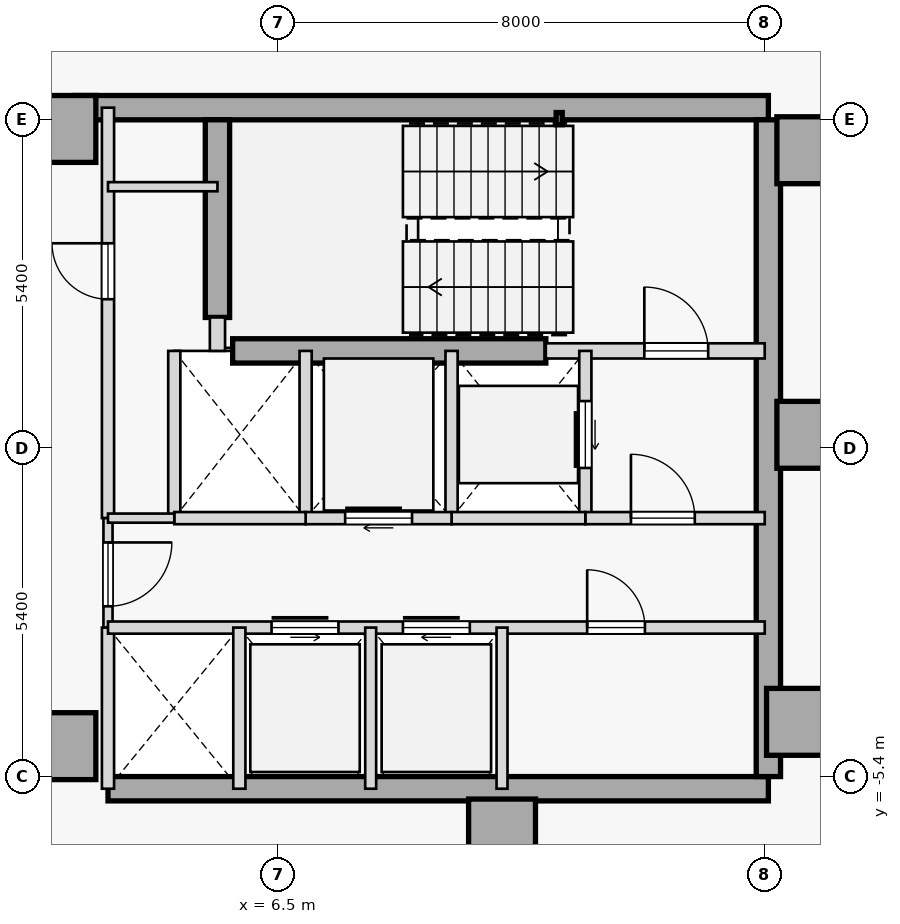
"""IFC4 building model, lengths in metres.
Left out: names, types, materials, properties, quantities, classifications, styles, units other than length and angle.
Written with IfcOpenShell. Run it as: python <this file> out.ifc"""

import sys

from ifc_helpers import new_model, si_unit, direction, frame, frame_2d, origin, origin_2d, place, context, subcontext, project, spatial, rectangle, hollow_rectangle, extrude, element, fill, save


model = new_model("IFC4")
c1 = context("Model", 3, precision=1e-05, world=origin(), true_north=direction((0.0, 1.0)))
c2 = subcontext(c1, "Body", "Model", "MODEL_VIEW")
j1 = project(units=[si_unit("LENGTHUNIT", "METRE"), si_unit("PLANEANGLEUNIT", "RADIAN")], contexts=[c1])
p1 = place(None, origin())
s1 = spatial("IfcSite", under=j1, at=p1, CompositionType="ELEMENT")
p2 = place(p1, origin())
s2 = spatial("IfcBuilding", under=s1, at=p2, CompositionType="ELEMENT")
p3 = place(p2, frame((0.0, 0.0, 124.4)))
s3 = spatial("IfcBuildingStorey", under=s2, at=p3, CompositionType="ELEMENT", Elevation=124.4)
for number, where, z_axis, x_axis in (
    (1, (15.25, 4.9, 0.0), (0.0, 0.0, 1.0), (1.0, 0.0, 0.0)),
    (2, (15.25, 0.22, 0.0), (0.0, 0.0, 1.0), (1.0, 0.0, 0.0)),
    (3, (15.08, -4.5, 0.0), (0.0, 0.0, 1.0), (1.0, 0.0, 0.0)),
    (4, (10.18, -6.32, 0.0), (0.0, 0.0, 1.0), (1.0, 0.0, 0.0)),
    (5, (2.95, -4.9, 0.0), (0.0, 0.0, 1.0), (1.0, 0.0, 0.0)),
    (6, (2.95, 5.25, 0.0), (0.0, 0.0, 1.0), (1.0, 0.0, 0.0)),
):
    element("IfcColumn", number, at=place(p3, frame(where, z_axis=z_axis, x_axis=x_axis)), inside=s3, PredefinedType="COLUMN", context=c2, shape_type="SweptSolid", body=[
        extrude(rectangle(XDim=1.1, YDim=1.1, at=origin_2d()), origin(), (0.0, 0.0, 1.0), 3.7),
    ])
p4 = place(p3, frame((3.15, 5.6, 0.0), z_axis=(0.0, 0.0, 1.0), x_axis=(1.0, 0.0, 0.0)))
e7 = element("IfcWall", 7, at=p4, inside=s3, PredefinedType="SHEAR", context=c2, shape_type="SweptSolid", body=[
    extrude(rectangle(XDim=11.41, YDim=0.4, at=frame_2d((5.705, 0.0))), origin(), (0.0, 0.0, 1.0), 3.475),
])
p5 = place(p3, frame((3.7, -5.6, 0.0), z_axis=(0.0, 0.0, 1.0), x_axis=(1.0, 0.0, 0.0)))
e8 = element("IfcWall", 8, at=p5, inside=s3, PredefinedType="SHEAR", context=c2, shape_type="SweptSolid", body=[
    extrude(rectangle(XDim=10.86, YDim=0.4, at=frame_2d((5.43, 0.0))), origin(), (0.0, 0.0, 1.0), 3.475),
])
p6 = place(p3, frame((14.56, -5.4, 0.0), z_axis=(0.0, 0.0, 1.0), x_axis=(0.0, 1.0, 0.0)))
e9 = element("IfcWall", 9, at=p6, inside=s3, PredefinedType="SHEAR", context=c2, shape_type="SweptSolid", body=[
    extrude(rectangle(XDim=10.8, YDim=0.4, at=frame_2d((5.4, 0.0))), origin(), (0.0, 0.0, 1.0), 3.475),
])
p7 = place(p3, frame((5.5, 2.15, 0.0), z_axis=(0.0, 0.0, 1.0), x_axis=(0.0, 1.0, 0.0)))
e10 = element("IfcWall", 10, at=p7, inside=s3, PredefinedType="SHEAR", context=c2, shape_type="SweptSolid", body=[
    extrude(rectangle(XDim=3.25, YDim=0.4, at=frame_2d((1.625, 0.0))), origin(), (0.0, 0.0, 1.0), 3.475),
])
p8 = place(p3, frame((5.75, 1.6, 0.0), z_axis=(0.0, 0.0, 1.0), x_axis=(1.0, 0.0, 0.0)))
e11 = element("IfcWall", 11, at=p8, inside=s3, PredefinedType="SHEAR", context=c2, shape_type="SweptSolid", body=[
    extrude(rectangle(XDim=5.15, YDim=0.4, at=frame_2d((2.575, 0.0))), origin(), (0.0, 0.0, 1.0), 3.475),
])
p9 = place(p3, frame((11.12, 5.42, 0.0), z_axis=(0.0, 0.0, 1.0), x_axis=(1.0, 0.0, 0.0)))
e12 = element("IfcColumn", 12, at=p9, inside=s3, PredefinedType="COLUMN", context=c2, shape_type="SweptSolid", body=[
    extrude(hollow_rectangle(XDim=0.1, YDim=0.2, WallThickness=0.008, at=origin_2d()), origin(), (0.0, 0.0, 1.0), 3.7),
])
p10 = place(p3, frame((10.9, 1.6, 0.0), z_axis=(0.0, 0.0, 1.0), x_axis=(1.0, 0.0, 0.0)))
e13 = element("IfcWall", 13, at=p10, inside=s3, PredefinedType="STANDARD", context=c2, shape_type="SweptSolid", body=[
    extrude(rectangle(XDim=3.6, YDim=0.25, at=frame_2d((1.8, 0.0))), origin(), (0.0, 0.0, 1.0), 3.475),
])
p11 = place(p10, frame((1.62, 0.0, 0.0)))
e14 = element("IfcOpeningElement", 14, at=p11, cuts=e13, PredefinedType="OPENING", context=c2, shape_type="SweptSolid", body=[
    extrude(rectangle(XDim=1.05, YDim=2.15, at=frame_2d((0.525, 1.075))), frame((0.0, 0.135, 0.0), z_axis=(0.0, -1.0, 0.0), x_axis=(1.0, 0.0, 0.0)), (0.0, 0.0, 1.0), 0.27),
])
p12 = place(p3, frame((5.5, 1.6, 0.0), z_axis=(0.0, 0.0, 1.0), x_axis=(0.0, 1.0, 0.0)))
e15 = element("IfcWall", 15, at=p12, inside=s3, PredefinedType="STANDARD", context=c2, shape_type="SweptSolid", body=[
    extrude(rectangle(XDim=0.55, YDim=0.25, at=frame_2d((0.275, 0.0))), origin(), (0.0, 0.0, 1.0), 3.475),
])
p13 = place(p3, frame((3.7, -1.15, 0.0), z_axis=(0.0, 0.0, 1.0), x_axis=(0.0, 1.0, 0.0)))
e16 = element("IfcWall", 16, at=p13, inside=s3, PredefinedType="STANDARD", context=c2, shape_type="SweptSolid", body=[
    extrude(rectangle(XDim=6.75, YDim=0.2, at=frame_2d((3.375, 0.0))), origin(), (0.0, 0.0, 1.0), 3.475),
])
p14 = place(p13, frame((3.6, 0.0, 0.0)))
e17 = element("IfcOpeningElement", 17, at=p14, cuts=e16, PredefinedType="OPENING", context=c2, shape_type="SweptSolid", body=[
    extrude(rectangle(XDim=0.92, YDim=2.15, at=frame_2d((0.46, 1.075))), frame((0.0, 0.11, 0.0), z_axis=(0.0, -1.0, 0.0), x_axis=(1.0, 0.0, 0.0)), (0.0, 0.0, 1.0), 0.22),
])
p15 = place(p3, frame((3.7, -2.95, 0.0), z_axis=(0.0, 0.0, 1.0), x_axis=(0.0, 1.0, 0.0)))
e18 = element("IfcWall", 18, at=p15, inside=s3, PredefinedType="PARTITIONING", context=c2, shape_type="SweptSolid", body=[
    extrude(rectangle(XDim=1.8, YDim=0.15, at=frame_2d((0.9, 0.0))), origin(), (0.0, 0.0, 1.0), 3.475),
])
p16 = place(p15, frame((0.35, 0.0, 0.0)))
e19 = element("IfcOpeningElement", 19, at=p16, cuts=e18, PredefinedType="OPENING", context=c2, shape_type="SweptSolid", body=[
    extrude(rectangle(XDim=1.05, YDim=2.18, at=frame_2d((0.525, 1.09))), frame((0.0, 0.085, 0.0), z_axis=(0.0, -1.0, 0.0), x_axis=(1.0, 0.0, 0.0)), (0.0, 0.0, 1.0), 0.17),
])
p17 = place(p3, frame((3.7, -5.6, 0.0), z_axis=(0.0, 0.0, 1.0), x_axis=(0.0, 1.0, 0.0)))
e20 = element("IfcWall", 20, at=p17, inside=s3, PredefinedType="STANDARD", context=c2, shape_type="SweptSolid", body=[
    extrude(rectangle(XDim=2.65, YDim=0.2, at=frame_2d((1.325, 0.0))), origin(), (0.0, 0.0, 1.0), 3.475),
])
p18 = place(p3, frame((11.55, -1.15, 0.0), z_axis=(0.0, 0.0, 1.0), x_axis=(0.0, 1.0, 0.0)))
e21 = element("IfcWall", 21, at=p18, inside=s3, PredefinedType="STANDARD", context=c2, shape_type="SweptSolid", body=[
    extrude(rectangle(XDim=2.75, YDim=0.2, at=frame_2d((1.375, 0.0))), origin(), (0.0, 0.0, 1.0), 3.475),
])
p19 = place(p18, frame((0.825, 0.0, 0.0)))
e22 = element("IfcOpeningElement", 22, at=p19, cuts=e21, PredefinedType="OPENING", context=c2, shape_type="SweptSolid", body=[
    extrude(rectangle(XDim=1.1, YDim=2.15, at=frame_2d((0.55, 1.075))), frame((0.0, 0.11, 0.0), z_axis=(0.0, -1.0, 0.0), x_axis=(1.0, 0.0, 0.0)), (0.0, 0.0, 1.0), 0.22),
])
p20 = place(p3, frame((9.35, -1.15, 0.0), z_axis=(0.0, 0.0, 1.0), x_axis=(0.0, 1.0, 0.0)))
e23 = element("IfcWall", 23, at=p20, inside=s3, PredefinedType="STANDARD", context=c2, shape_type="SweptSolid", body=[
    extrude(rectangle(XDim=2.75, YDim=0.2, at=frame_2d((1.375, 0.0))), origin(), (0.0, 0.0, 1.0), 3.475),
])
p21 = place(p3, frame((11.55, -1.15, 0.0), z_axis=(0.0, 0.0, 1.0), x_axis=(1.0, 0.0, 0.0)))
e24 = element("IfcWall", 24, at=p21, inside=s3, PredefinedType="STANDARD", context=c2, shape_type="SweptSolid", body=[
    extrude(rectangle(XDim=2.95, YDim=0.2, at=frame_2d((1.475, 0.0))), origin(), (0.0, 0.0, 1.0), 3.475),
])
p22 = place(p21, frame((0.75, 0.0, 0.0)))
e25 = element("IfcOpeningElement", 25, at=p22, cuts=e24, PredefinedType="OPENING", context=c2, shape_type="SweptSolid", body=[
    extrude(rectangle(XDim=1.05, YDim=2.18, at=frame_2d((0.525, 1.09))), frame((0.0, 0.11, 0.0), z_axis=(0.0, -1.0, 0.0), x_axis=(1.0, 0.0, 0.0)), (0.0, 0.0, 1.0), 0.22),
])
p23 = place(p3, frame((9.35, -1.15, 0.0), z_axis=(0.0, 0.0, 1.0), x_axis=(1.0, 0.0, 0.0)))
e26 = element("IfcWall", 26, at=p23, inside=s3, PredefinedType="STANDARD", context=c2, shape_type="SweptSolid", body=[
    extrude(rectangle(XDim=2.2, YDim=0.2, at=frame_2d((1.1, 0.0))), origin(), (0.0, 0.0, 1.0), 3.475),
])
p24 = place(p3, frame((6.95, -1.15, 0.0), z_axis=(0.0, 0.0, 1.0), x_axis=(0.0, 1.0, 0.0)))
e27 = element("IfcWall", 27, at=p24, inside=s3, PredefinedType="STANDARD", context=c2, shape_type="SweptSolid", body=[
    extrude(rectangle(XDim=2.75, YDim=0.2, at=frame_2d((1.375, 0.0))), origin(), (0.0, 0.0, 1.0), 3.475),
])
p25 = place(p3, frame((6.95, -1.15, 0.0), z_axis=(0.0, 0.0, 1.0), x_axis=(1.0, 0.0, 0.0)))
e28 = element("IfcWall", 28, at=p25, inside=s3, PredefinedType="STANDARD", context=c2, shape_type="SweptSolid", body=[
    extrude(rectangle(XDim=2.4, YDim=0.2, at=frame_2d((1.2, 0.0))), origin(), (0.0, 0.0, 1.0), 3.475),
])
p26 = place(p25, frame((0.65, 0.0, 0.0)))
e29 = element("IfcOpeningElement", 29, at=p26, cuts=e28, PredefinedType="OPENING", context=c2, shape_type="SweptSolid", body=[
    extrude(rectangle(XDim=1.1, YDim=2.15, at=frame_2d((0.55, 1.075))), frame((0.0, 0.11, 0.0), z_axis=(0.0, -1.0, 0.0), x_axis=(1.0, 0.0, 0.0)), (0.0, 0.0, 1.0), 0.22),
])
p27 = place(p3, frame((4.79, -1.15, 0.0), z_axis=(0.0, 0.0, 1.0), x_axis=(0.0, 1.0, 0.0)))
e30 = element("IfcWall", 30, at=p27, inside=s3, PredefinedType="STANDARD", context=c2, shape_type="SweptSolid", body=[
    extrude(rectangle(XDim=2.75, YDim=0.2, at=frame_2d((1.375, 0.0))), origin(), (0.0, 0.0, 1.0), 3.475),
])
p28 = place(p3, frame((4.79, -1.15, 0.0), z_axis=(0.0, 0.0, 1.0), x_axis=(1.0, 0.0, 0.0)))
e31 = element("IfcWall", 31, at=p28, inside=s3, PredefinedType="STANDARD", context=c2, shape_type="SweptSolid", body=[
    extrude(rectangle(XDim=2.16, YDim=0.2, at=frame_2d((1.08, 0.0))), origin(), (0.0, 0.0, 1.0), 3.475),
])
p29 = place(p3, frame((3.7, -1.15, 0.0), z_axis=(0.0, 0.0, 1.0), x_axis=(1.0, 0.0, 0.0)))
e32 = element("IfcWall", 32, at=p29, inside=s3, PredefinedType="PARTITIONING", context=c2, shape_type="SweptSolid", body=[
    extrude(rectangle(XDim=1.09, YDim=0.15, at=frame_2d((0.545, 0.0))), origin(), (0.0, 0.0, 1.0), 3.475),
])
p30 = place(p3, frame((3.7, -2.95, 0.0), z_axis=(0.0, 0.0, 1.0), x_axis=(1.0, 0.0, 0.0)))
e33 = element("IfcWall", 33, at=p30, inside=s3, PredefinedType="STANDARD", context=c2, shape_type="SweptSolid", body=[
    extrude(rectangle(XDim=10.8, YDim=0.2, at=frame_2d((5.4, 0.0))), origin(), (0.0, 0.0, 1.0), 3.475),
])
p31 = place(p30, frame((2.69, 0.0, 0.0)))
e34 = element("IfcOpeningElement", 34, at=p31, cuts=e33, PredefinedType="OPENING", context=c2, shape_type="SweptSolid", body=[
    extrude(rectangle(XDim=1.1, YDim=2.15, at=frame_2d((0.55, 1.075))), frame((0.0, 0.11, 0.0), z_axis=(0.0, -1.0, 0.0), x_axis=(1.0, 0.0, 0.0)), (0.0, 0.0, 1.0), 0.22),
])
p32 = place(p30, frame((4.85, 0.0, 0.0)))
e35 = element("IfcOpeningElement", 35, at=p32, cuts=e33, PredefinedType="OPENING", context=c2, shape_type="SweptSolid", body=[
    extrude(rectangle(XDim=1.1, YDim=2.15, at=frame_2d((0.55, 1.075))), frame((0.0, 0.11, 0.0), z_axis=(0.0, -1.0, 0.0), x_axis=(1.0, 0.0, 0.0)), (0.0, 0.0, 1.0), 0.22),
])
p33 = place(p30, frame((7.88, 0.0, 0.0)))
e36 = element("IfcOpeningElement", 36, at=p33, cuts=e33, PredefinedType="OPENING", context=c2, shape_type="SweptSolid", body=[
    extrude(rectangle(XDim=0.95, YDim=2.15, at=frame_2d((0.475, 1.075))), frame((0.0, 0.11, 0.0), z_axis=(0.0, -1.0, 0.0), x_axis=(1.0, 0.0, 0.0)), (0.0, 0.0, 1.0), 0.22),
])
p34 = place(p3, frame((5.86, -5.6, 0.0), z_axis=(0.0, 0.0, 1.0), x_axis=(0.0, 1.0, 0.0)))
e37 = element("IfcWall", 37, at=p34, inside=s3, PredefinedType="STANDARD", context=c2, shape_type="SweptSolid", body=[
    extrude(rectangle(XDim=2.65, YDim=0.2, at=frame_2d((1.325, 0.0))), origin(), (0.0, 0.0, 1.0), 3.475),
])
for number, where, z_axis, x_axis in (
    (38, (10.18, -5.6, 0.0), (0.0, 0.0, 1.0), (0.0, 1.0, 0.0)),
    (39, (8.02, -5.6, 0.0), (0.0, 0.0, 1.0), (0.0, 1.0, 0.0)),
):
    element("IfcWall", number, at=place(p3, frame(where, z_axis=z_axis, x_axis=x_axis)), inside=s3, PredefinedType="STANDARD", context=c2, shape_type="SweptSolid", body=[
        extrude(rectangle(XDim=2.65, YDim=0.18, at=frame_2d((1.325, 0.0))), origin(), (0.0, 0.0, 1.0), 3.475),
    ])
p35 = place(p3, frame((3.7, 4.3, 0.0), z_axis=(0.0, 0.0, 1.0), x_axis=(1.0, 0.0, 0.0)))
e40 = element("IfcWall", 40, at=p35, inside=s3, PredefinedType="PARTITIONING", context=c2, shape_type="SweptSolid", body=[
    extrude(rectangle(XDim=1.8, YDim=0.15, at=frame_2d((0.9, 0.0))), origin(), (0.0, 0.0, 1.0), 3.475),
])
p36 = place(p11, origin())
e41 = element("IfcDoor", 41, at=p36, inside=s3, OperationType="SINGLE_SWING_LEFT", PredefinedType="DOOR", context=c2, shape_type="SweptSolid", body=[
    extrude(rectangle(XDim=1.05, YDim=2.15, at=frame_2d((0.525, 1.075))), frame((0.0, 0.025, 0.0), z_axis=(0.0, -1.0, 0.0), x_axis=(1.0, 0.0, 0.0)), (0.0, 0.0, 1.0), 0.05),
])
fill(e14, e41)
p37 = place(p22, origin())
e42 = element("IfcDoor", 42, at=p37, inside=s3, OperationType="SINGLE_SWING_LEFT", PredefinedType="DOOR", context=c2, shape_type="SweptSolid", body=[
    extrude(rectangle(XDim=1.05, YDim=2.18, at=frame_2d((0.525, 1.09))), frame((0.0, 0.025, 0.0), z_axis=(0.0, -1.0, 0.0), x_axis=(1.0, 0.0, 0.0)), (0.0, 0.0, 1.0), 0.05),
])
fill(e25, e42)
p38 = place(p16, frame((1.05, 0.0, 0.0), z_axis=(0.0, 0.0, 1.0), x_axis=(-1.0, 0.0, 0.0)))
e43 = element("IfcDoor", 43, at=p38, inside=s3, OperationType="SINGLE_SWING_RIGHT", PredefinedType="DOOR", context=c2, shape_type="SweptSolid", body=[
    extrude(rectangle(XDim=1.05, YDim=2.18, at=frame_2d((0.525, 1.09))), frame((0.0, 0.025, 0.0), z_axis=(0.0, -1.0, 0.0), x_axis=(1.0, 0.0, 0.0)), (0.0, 0.0, 1.0), 0.05),
])
fill(e19, e43)
p39 = place(p19, origin())
e44 = element("IfcDoor", 44, at=p39, inside=s3, OperationType="SLIDING_TO_RIGHT", PredefinedType="DOOR", context=c2, shape_type="SweptSolid", body=[
    extrude(rectangle(XDim=1.1, YDim=2.15, at=frame_2d((0.55, 1.075))), frame((0.0, 0.025, 0.0), z_axis=(0.0, -1.0, 0.0), x_axis=(1.0, 0.0, 0.0)), (0.0, 0.0, 1.0), 0.05),
])
fill(e22, e44)
p40 = place(p26, origin())
e45 = element("IfcDoor", 45, at=p40, inside=s3, OperationType="SLIDING_TO_RIGHT", PredefinedType="DOOR", context=c2, shape_type="SweptSolid", body=[
    extrude(rectangle(XDim=1.1, YDim=2.15, at=frame_2d((0.55, 1.075))), frame((0.0, 0.025, 0.0), z_axis=(0.0, -1.0, 0.0), x_axis=(1.0, 0.0, 0.0)), (0.0, 0.0, 1.0), 0.05),
])
fill(e29, e45)
p41 = place(p31, origin())
e46 = element("IfcDoor", 46, at=p41, inside=s3, OperationType="SLIDING_TO_LEFT", PredefinedType="DOOR", context=c2, shape_type="SweptSolid", body=[
    extrude(rectangle(XDim=1.1, YDim=2.15, at=frame_2d((0.55, 1.075))), frame((0.0, 0.025, 0.0), z_axis=(0.0, -1.0, 0.0), x_axis=(1.0, 0.0, 0.0)), (0.0, 0.0, 1.0), 0.05),
])
fill(e34, e46)
p42 = place(p32, origin())
e47 = element("IfcDoor", 47, at=p42, inside=s3, OperationType="SLIDING_TO_RIGHT", PredefinedType="DOOR", context=c2, shape_type="SweptSolid", body=[
    extrude(rectangle(XDim=1.1, YDim=2.15, at=frame_2d((0.55, 1.075))), frame((0.0, 0.025, 0.0), z_axis=(0.0, -1.0, 0.0), x_axis=(1.0, 0.0, 0.0)), (0.0, 0.0, 1.0), 0.05),
])
fill(e35, e47)
p43 = place(p33, origin())
e48 = element("IfcDoor", 48, at=p43, inside=s3, OperationType="SINGLE_SWING_LEFT", PredefinedType="DOOR", context=c2, shape_type="SweptSolid", body=[
    extrude(rectangle(XDim=0.95, YDim=2.15, at=frame_2d((0.475, 1.075))), frame((0.0, 0.025, 0.0), z_axis=(0.0, -1.0, 0.0), x_axis=(1.0, 0.0, 0.0)), (0.0, 0.0, 1.0), 0.05),
])
fill(e36, e48)
p44 = place(p14, origin())
e49 = element("IfcDoor", 49, at=p44, inside=s3, OperationType="SINGLE_SWING_RIGHT", PredefinedType="DOOR", context=c2, shape_type="SweptSolid", body=[
    extrude(rectangle(XDim=0.92, YDim=2.15, at=frame_2d((0.46, 1.075))), frame((0.0, 0.025, 0.0), z_axis=(0.0, -1.0, 0.0), x_axis=(1.0, 0.0, 0.0)), (0.0, 0.0, 1.0), 0.05),
])
fill(e17, e49)
save(model, sys.argv[1])
